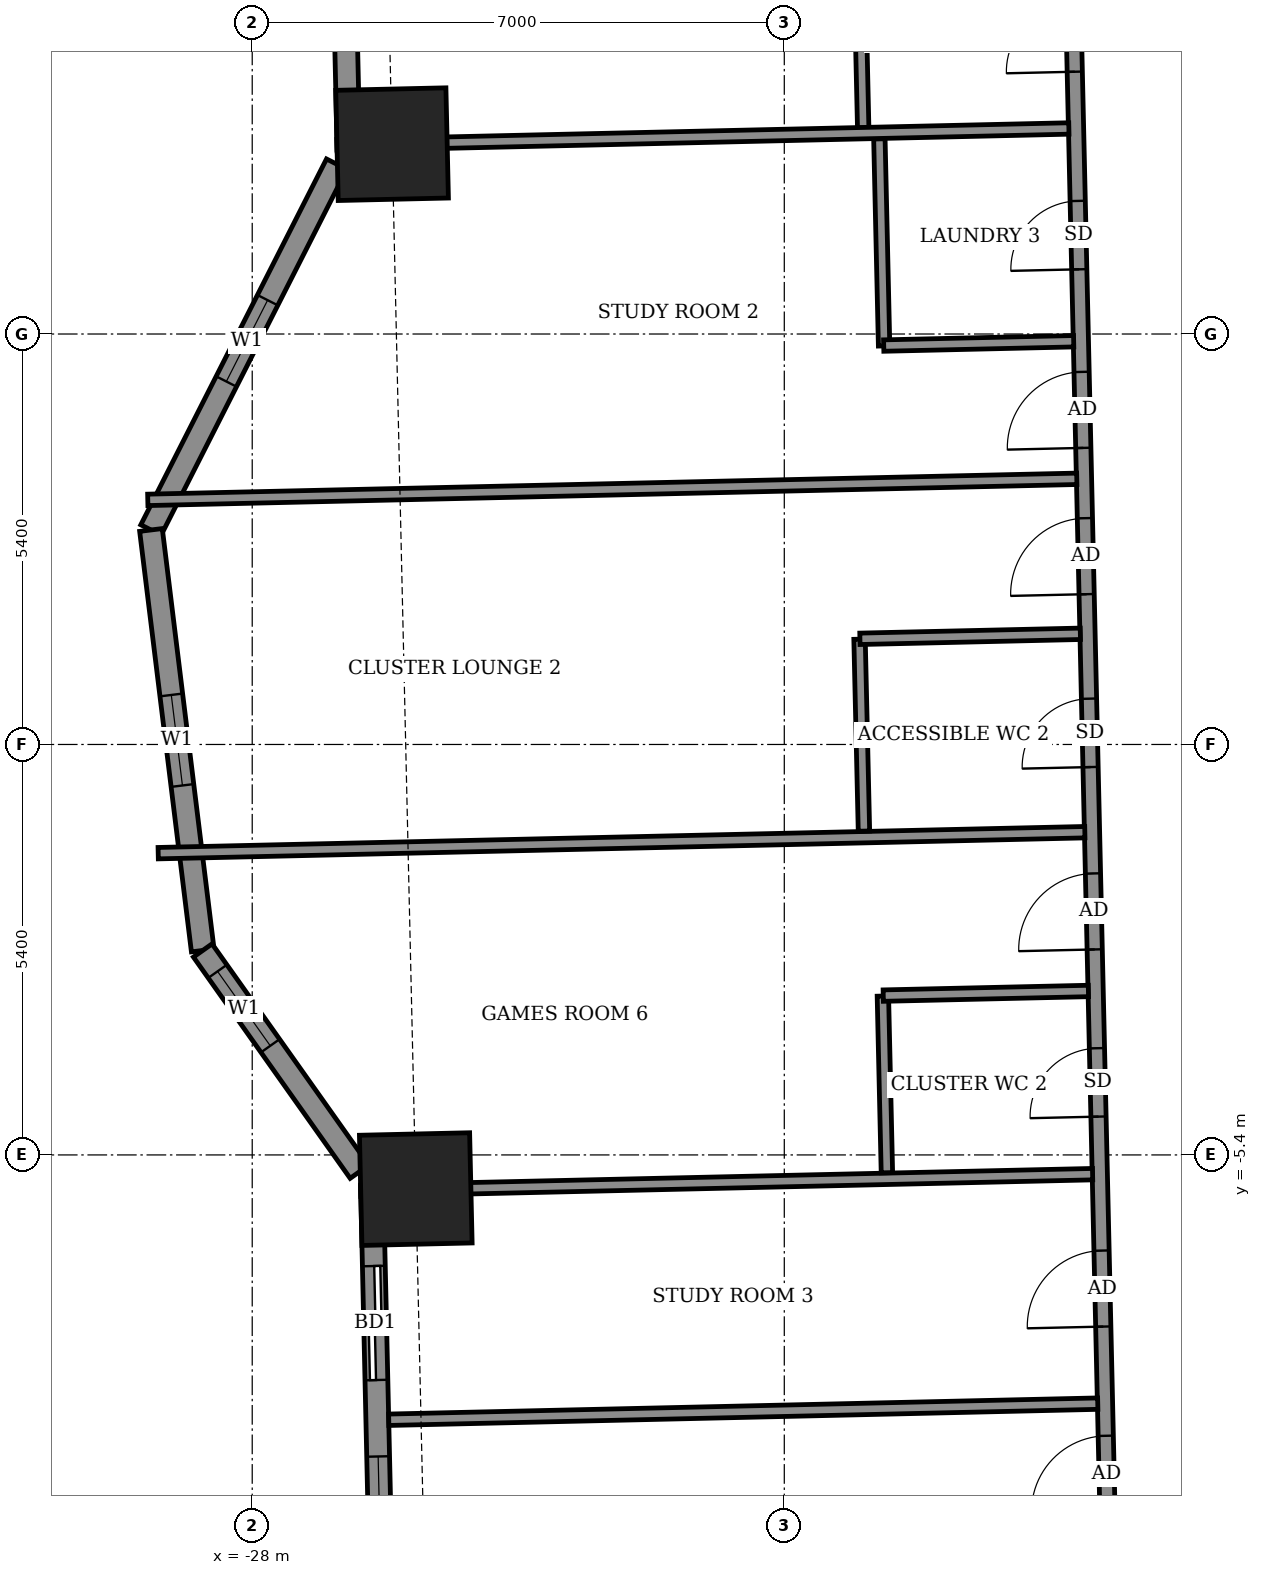
"""IFC4 building model, lengths in metres.
Left out: names, types, materials, properties, quantities, classifications, styles, units other than length and angle.
Written with IfcOpenShell. Run it as: python <this file> out.ifc"""

import sys

from ifc_helpers import new_model, si_unit, direction, frame, frame_2d, origin, origin_2d, place, context, subcontext, project, spatial, rectangle, extrude, element, fill, save


model = new_model("IFC4")
c1 = context("Model", 3, precision=1e-05, world=origin(), true_north=direction((0.0, 1.0)))
c2 = subcontext(c1, "Body", "Model", "MODEL_VIEW")
j1 = project(units=[si_unit("LENGTHUNIT", "METRE"), si_unit("PLANEANGLEUNIT", "RADIAN")], contexts=[c1])
p1 = place(None, origin())
s1 = spatial("IfcSite", under=j1, at=p1, CompositionType="ELEMENT")
p2 = place(p1, origin())
s2 = spatial("IfcBuilding", under=s1, at=p2, CompositionType="ELEMENT")
p3 = place(p2, frame((0.0, 0.0, 79.3)))
s3 = spatial("IfcBuildingStorey", under=s2, at=p3, CompositionType="ELEMENT", Elevation=79.3)
for number, where, z_axis, x_axis in (
    (1, (-25.848, -5.85, -0.55), (0.0, 0.0, 1.0), (0.023, -1.0, 0.0)),
    (2, (-26.16, 7.897, -0.55), (0.0, 0.0, 1.0), (0.023, -1.0, 0.0)),
):
    element("IfcColumn", number, at=place(p3, frame(where, z_axis=z_axis, x_axis=x_axis)), inside=s3, PredefinedType="COLUMN", context=c2, shape_type="SweptSolid", body=[
        extrude(rectangle(XDim=1.45, YDim=1.45, at=origin_2d()), origin(), (0.0, 0.0, 1.0), 3.6),
    ])
p4 = place(p3, frame((-27.036, 21.155, 0.0), z_axis=(0.0, 0.0, 1.0), x_axis=(0.022730142562, -0.999741636934, 0.0)))
e3 = element("IfcWall", 3, at=p4, inside=s3, PredefinedType="SOLIDWALL", context=c2, shape_type="SweptSolid", body=[
    extrude(rectangle(XDim=13.329, YDim=0.3, at=frame_2d((6.665, 0.0))), origin(), (0.0, 0.0, 1.0), 3.05),
])
p5 = place(p4, frame((2.818, 0.0, 0.0)))
e4 = element("IfcOpeningElement", 4, at=p5, cuts=e3, PredefinedType="OPENING", context=c2, shape_type="SweptSolid", body=[
    extrude(rectangle(XDim=1.5, YDim=2.4, at=frame_2d((0.75, 1.2))), frame((0.0, 0.16, 0.0), z_axis=(0.0, -1.0, 0.0), x_axis=(1.0, 0.0, 0.0)), (0.0, 0.0, 1.0), 0.32),
])
p6 = place(p4, frame((9.6, 0.0, 0.9)))
e5 = element("IfcOpeningElement", 5, at=p6, cuts=e3, PredefinedType="OPENING", context=c2, shape_type="SweptSolid", body=[
    extrude(rectangle(XDim=2.4, YDim=1.5, at=frame_2d((1.2, 0.75))), frame((0.0, 0.16, 0.0), z_axis=(0.0, -1.0, 0.0), x_axis=(1.0, 0.0, 0.0)), (0.0, 0.0, 1.0), 0.32),
])
p7 = place(p3, frame((-26.889, 7.635, 0.0), z_axis=(0.0, 0.0, 1.0), x_axis=(-0.452633159278, -0.891696822425, 0.0)))
e6 = element("IfcWall", 6, at=p7, inside=s3, PredefinedType="SOLIDWALL", context=c2, shape_type="SweptSolid", body=[
    extrude(rectangle(XDim=5.397, YDim=0.3, at=frame_2d((2.699, 0.0))), origin(), (0.0, 0.0, 1.0), 3.05),
])
p8 = place(p7, frame((2.007, 0.0, 0.9)))
e7 = element("IfcOpeningElement", 7, at=p8, cuts=e6, PredefinedType="OPENING", context=c2, shape_type="SweptSolid", body=[
    extrude(rectangle(XDim=1.2, YDim=1.5, at=frame_2d((0.6, 0.75))), frame((0.0, 0.16, 0.0), z_axis=(0.0, -1.0, 0.0), x_axis=(1.0, 0.0, 0.0)), (0.0, 0.0, 1.0), 0.32),
])
p9 = place(p3, frame((-29.332, 2.822, 0.0), z_axis=(0.0, 0.0, 1.0), x_axis=(0.122206978992, -0.992504636909, 0.0)))
e8 = element("IfcWall", 8, at=p9, inside=s3, PredefinedType="SOLIDWALL", context=c2, shape_type="SweptSolid", body=[
    extrude(rectangle(XDim=5.574, YDim=0.3, at=frame_2d((2.787, 0.0))), origin(), (0.0, 0.0, 1.0), 3.05),
])
p10 = place(p9, frame((2.187, 0.0, 0.9)))
e9 = element("IfcOpeningElement", 9, at=p10, cuts=e8, PredefinedType="OPENING", context=c2, shape_type="SweptSolid", body=[
    extrude(rectangle(XDim=1.2, YDim=1.5, at=frame_2d((0.6, 0.75))), frame((0.0, 0.16, 0.0), z_axis=(0.0, -1.0, 0.0), x_axis=(1.0, 0.0, 0.0)), (0.0, 0.0, 1.0), 0.32),
])
p11 = place(p3, frame((-28.651, -2.71, 0.0), z_axis=(0.0, 0.0, 1.0), x_axis=(0.577964171051, -0.816062140392, 0.0)))
e10 = element("IfcWall", 10, at=p11, inside=s3, PredefinedType="SOLIDWALL", context=c2, shape_type="SweptSolid", body=[
    extrude(rectangle(XDim=3.567, YDim=0.3, at=frame_2d((1.784, 0.0))), origin(), (0.0, 0.0, 1.0), 3.05),
])
p12 = place(p11, frame((0.337, 0.0, 0.9)))
e11 = element("IfcOpeningElement", 11, at=p12, cuts=e10, PredefinedType="OPENING", context=c2, shape_type="SweptSolid", body=[
    extrude(rectangle(XDim=1.2, YDim=1.5, at=frame_2d((0.6, 0.75))), frame((0.0, 0.16, 0.0), z_axis=(0.0, -1.0, 0.0), x_axis=(1.0, 0.0, 0.0)), (0.0, 0.0, 1.0), 0.32),
])
p13 = place(p3, frame((-26.424, -5.808, 0.0), z_axis=(0.0, 0.0, 1.0), x_axis=(0.022654755793, -0.999743348085, 0.0)))
e12 = element("IfcWall", 12, at=p13, inside=s3, PredefinedType="SOLIDWALL", context=c2, shape_type="SweptSolid", body=[
    extrude(rectangle(XDim=13.729, YDim=0.3, at=frame_2d((6.865, 0.0))), origin(), (0.0, 0.0, 1.0), 3.05),
])
p14 = place(p13, frame((1.054, 0.0, 0.0)))
e13 = element("IfcOpeningElement", 13, at=p14, cuts=e12, PredefinedType="OPENING", context=c2, shape_type="SweptSolid", body=[
    extrude(rectangle(XDim=1.5, YDim=2.4, at=frame_2d((0.75, 1.2))), frame((0.0, 0.16, 0.0), z_axis=(0.0, -1.0, 0.0), x_axis=(1.0, 0.0, 0.0)), (0.0, 0.0, 1.0), 0.32),
])
p15 = place(p13, frame((3.56, 0.0, 0.9)))
e14 = element("IfcOpeningElement", 14, at=p15, cuts=e12, PredefinedType="OPENING", context=c2, shape_type="SweptSolid", body=[
    extrude(rectangle(XDim=2.4, YDim=1.5, at=frame_2d((1.2, 0.75))), frame((0.0, 0.16, 0.0), z_axis=(0.0, -1.0, 0.0), x_axis=(1.0, 0.0, 0.0)), (0.0, 0.0, 1.0), 0.32),
])
p16 = place(p13, frame((8.882, 0.0, 0.9)))
e15 = element("IfcOpeningElement", 15, at=p16, cuts=e12, PredefinedType="OPENING", context=c2, shape_type="SweptSolid", body=[
    extrude(rectangle(XDim=2.4, YDim=1.5, at=frame_2d((1.2, 0.75))), frame((0.0, 0.16, 0.0), z_axis=(0.0, -1.0, 0.0), x_axis=(1.0, 0.0, 0.0)), (0.0, 0.0, 1.0), 0.32),
])
p17 = place(p3, frame((-16.684, -12.919, 0.0), z_axis=(0.0, 0.0, 1.0), x_axis=(-0.022706151961, 0.999742182097, 0.0)))
e16 = element("IfcWall", 16, at=p17, inside=s3, PredefinedType="PARTITIONING", context=c2, shape_type="SweptSolid", body=[
    extrude(rectangle(XDim=25.45, YDim=0.2, at=frame_2d((12.725, 0.0))), origin(), (0.0, 0.0, 1.0), 3.05),
])
p18 = place(p17, frame((23.938, 0.0, 0.0)))
e17 = element("IfcOpeningElement", 17, at=p18, cuts=e16, PredefinedType="OPENING", context=c2, shape_type="SweptSolid", body=[
    extrude(rectangle(XDim=1.0, YDim=2.1, at=frame_2d((0.5, 1.05))), frame((0.0, 0.11, 0.0), z_axis=(0.0, -1.0, 0.0), x_axis=(1.0, 0.0, 0.0)), (0.0, 0.0, 1.0), 0.22),
])
p19 = place(p17, frame((21.775, 0.0, 0.0)))
e18 = element("IfcOpeningElement", 18, at=p19, cuts=e16, PredefinedType="OPENING", context=c2, shape_type="SweptSolid", body=[
    extrude(rectangle(XDim=0.9, YDim=2.1, at=frame_2d((0.45, 1.05))), frame((0.0, 0.11, 0.0), z_axis=(0.0, -1.0, 0.0), x_axis=(1.0, 0.0, 0.0)), (0.0, 0.0, 1.0), 0.22),
])
p20 = place(p17, frame((16.825, 0.0, 0.0)))
e19 = element("IfcOpeningElement", 19, at=p20, cuts=e16, PredefinedType="OPENING", context=c2, shape_type="SweptSolid", body=[
    extrude(rectangle(XDim=1.0, YDim=2.1, at=frame_2d((0.5, 1.05))), frame((0.0, 0.11, 0.0), z_axis=(0.0, -1.0, 0.0), x_axis=(1.0, 0.0, 0.0)), (0.0, 0.0, 1.0), 0.22),
])
p21 = place(p17, frame((19.175, 0.0, 0.0)))
e20 = element("IfcOpeningElement", 20, at=p21, cuts=e16, PredefinedType="OPENING", context=c2, shape_type="SweptSolid", body=[
    extrude(rectangle(XDim=0.9, YDim=2.1, at=frame_2d((0.45, 1.05))), frame((0.0, 0.11, 0.0), z_axis=(0.0, -1.0, 0.0), x_axis=(1.0, 0.0, 0.0)), (0.0, 0.0, 1.0), 0.22),
])
p22 = place(p17, frame((14.9, 0.0, 0.0)))
e21 = element("IfcOpeningElement", 21, at=p22, cuts=e16, PredefinedType="OPENING", context=c2, shape_type="SweptSolid", body=[
    extrude(rectangle(XDim=1.0, YDim=2.1, at=frame_2d((0.5, 1.05))), frame((0.0, 0.11, 0.0), z_axis=(0.0, -1.0, 0.0), x_axis=(1.0, 0.0, 0.0)), (0.0, 0.0, 1.0), 0.22),
])
p23 = place(p17, frame((12.625, 0.0, 0.0)))
e22 = element("IfcOpeningElement", 22, at=p23, cuts=e16, PredefinedType="OPENING", context=c2, shape_type="SweptSolid", body=[
    extrude(rectangle(XDim=0.9, YDim=2.1, at=frame_2d((0.45, 1.05))), frame((0.0, 0.11, 0.0), z_axis=(0.0, -1.0, 0.0), x_axis=(1.0, 0.0, 0.0)), (0.0, 0.0, 1.0), 0.22),
])
p24 = place(p17, frame((10.225, 0.0, 0.0)))
e23 = element("IfcOpeningElement", 23, at=p24, cuts=e16, PredefinedType="OPENING", context=c2, shape_type="SweptSolid", body=[
    extrude(rectangle(XDim=1.0, YDim=2.1, at=frame_2d((0.5, 1.05))), frame((0.0, 0.11, 0.0), z_axis=(0.0, -1.0, 0.0), x_axis=(1.0, 0.0, 0.0)), (0.0, 0.0, 1.0), 0.22),
])
p25 = place(p17, frame((8.025, 0.0, 0.0)))
e24 = element("IfcOpeningElement", 24, at=p25, cuts=e16, PredefinedType="OPENING", context=c2, shape_type="SweptSolid", body=[
    extrude(rectangle(XDim=0.9, YDim=2.1, at=frame_2d((0.45, 1.05))), frame((0.0, 0.11, 0.0), z_axis=(0.0, -1.0, 0.0), x_axis=(1.0, 0.0, 0.0)), (0.0, 0.0, 1.0), 0.22),
])
p26 = place(p17, frame((5.262, 0.0, 0.0)))
e25 = element("IfcOpeningElement", 25, at=p26, cuts=e16, PredefinedType="OPENING", context=c2, shape_type="SweptSolid", body=[
    extrude(rectangle(XDim=1.0, YDim=2.1, at=frame_2d((0.5, 1.05))), frame((0.0, 0.11, 0.0), z_axis=(0.0, -1.0, 0.0), x_axis=(1.0, 0.0, 0.0)), (0.0, 0.0, 1.0), 0.22),
])
p27 = place(p17, frame((2.825, 0.0, 0.0)))
e26 = element("IfcOpeningElement", 26, at=p27, cuts=e16, PredefinedType="OPENING", context=c2, shape_type="SweptSolid", body=[
    extrude(rectangle(XDim=1.0, YDim=2.1, at=frame_2d((0.5, 1.05))), frame((0.0, 0.11, 0.0), z_axis=(0.0, -1.0, 0.0), x_axis=(1.0, 0.0, 0.0)), (0.0, 0.0, 1.0), 0.22),
])
p28 = place(p17, frame((0.75, 0.0, 0.0)))
e27 = element("IfcOpeningElement", 27, at=p28, cuts=e16, PredefinedType="OPENING", context=c2, shape_type="SweptSolid", body=[
    extrude(rectangle(XDim=0.9, YDim=2.1, at=frame_2d((0.45, 1.05))), frame((0.0, 0.11, 0.0), z_axis=(0.0, -1.0, 0.0), x_axis=(1.0, 0.0, 0.0)), (0.0, 0.0, 1.0), 0.22),
])
p29 = place(p3, frame((-26.204, -8.884, 0.0), z_axis=(0.0, 0.0, 1.0), x_axis=(0.999742051634, 0.022711895436, 0.0)))
e28 = element("IfcWall", 28, at=p29, inside=s3, PredefinedType="PARTITIONING", context=c2, shape_type="SweptSolid", body=[
    extrude(rectangle(XDim=9.331, YDim=0.15, at=frame_2d((4.665, 0.0))), origin(), (0.0, 0.0, 1.0), 2.55),
])
p30 = place(p3, frame((-26.573, -5.871, 0.0), z_axis=(0.0, 0.0, 1.0), x_axis=(0.999743768709, 0.022636186244, 0.0)))
e29 = element("IfcWall", 29, at=p30, inside=s3, PredefinedType="PARTITIONING", context=c2, shape_type="SweptSolid", body=[
    extrude(rectangle(XDim=9.631, YDim=0.15, at=frame_2d((4.816, 0.0))), origin(), (0.0, 0.0, 1.0), 3.05),
])
p31 = place(p3, frame((-19.65, -5.634, 0.0), z_axis=(0.0, 0.0, 1.0), x_axis=(-0.02279059109, 0.999740260747, 0.0)))
e30 = element("IfcWall", 30, at=p31, inside=s3, PredefinedType="PARTITIONING", context=c2, shape_type="SweptSolid", body=[
    extrude(rectangle(XDim=2.324, YDim=0.15, at=frame_2d((1.162, 0.0))), origin(), (0.0, 0.0, 1.0), 3.05),
])
p32 = place(p3, frame((-19.698, -3.304, 0.0), z_axis=(0.0, 0.0, 1.0), x_axis=(0.999744396973, 0.02260842146, 0.0)))
e31 = element("IfcWall", 31, at=p32, inside=s3, PredefinedType="PARTITIONING", context=c2, shape_type="SweptSolid", body=[
    extrude(rectangle(XDim=2.7, YDim=0.15, at=frame_2d((1.35, 0.0))), origin(), (0.0, 0.0, 1.0), 3.05),
])
p33 = place(p3, frame((-29.237, -1.43, 0.0), z_axis=(0.0, 0.0, 1.0), x_axis=(0.999744053012, 0.022623626312, 0.0)))
e32 = element("IfcWall", 32, at=p33, inside=s3, PredefinedType="PARTITIONING", context=c2, shape_type="SweptSolid", body=[
    extrude(rectangle(XDim=12.194, YDim=0.15, at=frame_2d((6.097, 0.0))), origin(), (0.0, 0.0, 1.0), 2.1),
])
p34 = place(p3, frame((-19.952, -1.14, 0.0), z_axis=(0.0, 0.0, 1.0), x_axis=(-0.023006865507, 0.999735307039, 0.0)))
e33 = element("IfcWall", 33, at=p34, inside=s3, PredefinedType="PARTITIONING", context=c2, shape_type="SweptSolid", body=[
    extrude(rectangle(XDim=2.526, YDim=0.15, at=frame_2d((1.263, 0.0))), origin(), (0.0, 0.0, 1.0), 3.05),
])
p35 = place(p3, frame((-20.005, 1.39, 0.0), z_axis=(0.0, 0.0, 1.0), x_axis=(0.999739832865, 0.022809352981, 0.0)))
e34 = element("IfcWall", 34, at=p35, inside=s3, PredefinedType="PARTITIONING", context=c2, shape_type="SweptSolid", body=[
    extrude(rectangle(XDim=2.901, YDim=0.15, at=frame_2d((1.45, 0.0))), origin(), (0.0, 0.0, 1.0), 3.05),
])
p36 = place(p3, frame((-29.374, 3.218, 0.0), z_axis=(0.0, 0.0, 1.0), x_axis=(0.99974308155, 0.022666514803, 0.0)))
e35 = element("IfcWall", 35, at=p36, inside=s3, PredefinedType="PARTITIONING", context=c2, shape_type="SweptSolid", body=[
    extrude(rectangle(XDim=12.225, YDim=0.15, at=frame_2d((6.113, 0.0))), origin(), (0.0, 0.0, 1.0), 2.1),
])
p37 = place(p3, frame((-19.687, 5.243, 0.0), z_axis=(0.0, 0.0, 1.0), x_axis=(-0.022758040381, 0.999741002259, 0.0)))
e36 = element("IfcWall", 36, at=p37, inside=s3, PredefinedType="PARTITIONING", context=c2, shape_type="SweptSolid", body=[
    extrude(rectangle(XDim=2.725, YDim=0.15, at=frame_2d((1.362, 0.0))), origin(), (0.0, 0.0, 1.0), 3.05),
])
p38 = place(p3, frame((-19.692, 5.248, 0.0), z_axis=(0.0, 0.0, 1.0), x_axis=(0.999740977561, 0.022759125332, 0.0)))
e37 = element("IfcWall", 37, at=p38, inside=s3, PredefinedType="PARTITIONING", context=c2, shape_type="SweptSolid", body=[
    extrude(rectangle(XDim=2.5, YDim=0.15, at=frame_2d((1.25, 0.0))), origin(), (0.0, 0.0, 1.0), 3.05),
])
p39 = place(p3, frame((-19.962, 8.112, 0.0), z_axis=(0.0, 0.0, 1.0), x_axis=(-0.022781023197, 0.999740478815, 0.0)))
e38 = element("IfcWall", 38, at=p39, inside=s3, PredefinedType="PARTITIONING", context=c2, shape_type="SweptSolid", body=[
    extrude(rectangle(XDim=2.325, YDim=0.15, at=frame_2d((1.163, 0.0))), origin(), (0.0, 0.0, 1.0), 3.05),
])
p40 = place(p3, frame((-26.885, 7.885, 0.0), z_axis=(0.0, 0.0, 1.0), x_axis=(0.999741468995, 0.022737527832, 0.0)))
e39 = element("IfcWall", 39, at=p40, inside=s3, PredefinedType="PARTITIONING", context=c2, shape_type="SweptSolid", body=[
    extrude(rectangle(XDim=9.631, YDim=0.15, at=frame_2d((4.816, 0.0))), origin(), (0.0, 0.0, 1.0), 3.05),
])
p41 = place(p8, origin())
e40 = element("IfcWindow", 40, at=p41, inside=s3, PartitioningType="SINGLE_PANEL", PredefinedType="WINDOW", context=c2, shape_type="SweptSolid", body=[
    extrude(rectangle(XDim=1.2, YDim=1.5, at=frame_2d((0.6, 0.75))), frame((0.0, 0.03, 0.0), z_axis=(0.0, -1.0, 0.0), x_axis=(1.0, 0.0, 0.0)), (0.0, 0.0, 1.0), 0.06),
])
fill(e7, e40)
p42 = place(p10, origin())
e41 = element("IfcWindow", 41, at=p42, inside=s3, PartitioningType="SINGLE_PANEL", PredefinedType="WINDOW", context=c2, shape_type="SweptSolid", body=[
    extrude(rectangle(XDim=1.2, YDim=1.5, at=frame_2d((0.6, 0.75))), frame((0.0, 0.03, 0.0), z_axis=(0.0, -1.0, 0.0), x_axis=(1.0, 0.0, 0.0)), (0.0, 0.0, 1.0), 0.06),
])
fill(e9, e41)
p43 = place(p12, origin())
e42 = element("IfcWindow", 42, at=p43, inside=s3, PartitioningType="SINGLE_PANEL", PredefinedType="WINDOW", context=c2, shape_type="SweptSolid", body=[
    extrude(rectangle(XDim=1.2, YDim=1.5, at=frame_2d((0.6, 0.75))), frame((0.0, 0.03, 0.0), z_axis=(0.0, -1.0, 0.0), x_axis=(1.0, 0.0, 0.0)), (0.0, 0.0, 1.0), 0.06),
])
fill(e11, e42)
p44 = place(p14, origin())
e43 = element("IfcDoor", 43, at=p44, inside=s3, OperationType="SLIDING_TO_LEFT", PredefinedType="DOOR", context=c2, shape_type="SweptSolid", body=[
    extrude(rectangle(XDim=1.5, YDim=2.4, at=frame_2d((0.75, 1.2))), frame((0.0, 0.025, 0.0), z_axis=(0.0, -1.0, 0.0), x_axis=(1.0, 0.0, 0.0)), (0.0, 0.0, 1.0), 0.05),
])
fill(e13, e43)
p45 = place(p15, origin())
e44 = element("IfcWindow", 44, at=p45, inside=s3, PartitioningType="DOUBLE_PANEL_VERTICAL", PredefinedType="WINDOW", context=c2, shape_type="SweptSolid", body=[
    extrude(rectangle(XDim=2.4, YDim=1.5, at=frame_2d((1.2, 0.75))), frame((0.0, 0.03, 0.0), z_axis=(0.0, -1.0, 0.0), x_axis=(1.0, 0.0, 0.0)), (0.0, 0.0, 1.0), 0.06),
])
fill(e14, e44)
p46 = place(p19, origin())
e45 = element("IfcDoor", 45, at=p46, inside=s3, OperationType="SINGLE_SWING_LEFT", PredefinedType="DOOR", context=c2, shape_type="SweptSolid", body=[
    extrude(rectangle(XDim=0.9, YDim=2.1, at=frame_2d((0.45, 1.05))), frame((0.0, 0.025, 0.0), z_axis=(0.0, -1.0, 0.0), x_axis=(1.0, 0.0, 0.0)), (0.0, 0.0, 1.0), 0.05),
])
fill(e18, e45)
p47 = place(p20, origin())
e46 = element("IfcDoor", 46, at=p47, inside=s3, OperationType="SINGLE_SWING_RIGHT", PredefinedType="DOOR", context=c2, shape_type="SweptSolid", body=[
    extrude(rectangle(XDim=1.0, YDim=2.1, at=frame_2d((0.5, 1.05))), frame((0.0, 0.025, 0.0), z_axis=(0.0, -1.0, 0.0), x_axis=(1.0, 0.0, 0.0)), (0.0, 0.0, 1.0), 0.05),
])
fill(e19, e46)
p48 = place(p21, origin())
e47 = element("IfcDoor", 47, at=p48, inside=s3, OperationType="SINGLE_SWING_RIGHT", PredefinedType="DOOR", context=c2, shape_type="SweptSolid", body=[
    extrude(rectangle(XDim=0.9, YDim=2.1, at=frame_2d((0.45, 1.05))), frame((0.0, 0.025, 0.0), z_axis=(0.0, -1.0, 0.0), x_axis=(1.0, 0.0, 0.0)), (0.0, 0.0, 1.0), 0.05),
])
fill(e20, e47)
p49 = place(p22, origin())
e48 = element("IfcDoor", 48, at=p49, inside=s3, OperationType="SINGLE_SWING_LEFT", PredefinedType="DOOR", context=c2, shape_type="SweptSolid", body=[
    extrude(rectangle(XDim=1.0, YDim=2.1, at=frame_2d((0.5, 1.05))), frame((0.0, 0.025, 0.0), z_axis=(0.0, -1.0, 0.0), x_axis=(1.0, 0.0, 0.0)), (0.0, 0.0, 1.0), 0.05),
])
fill(e21, e48)
p50 = place(p23, origin())
e49 = element("IfcDoor", 49, at=p50, inside=s3, OperationType="SINGLE_SWING_LEFT", PredefinedType="DOOR", context=c2, shape_type="SweptSolid", body=[
    extrude(rectangle(XDim=0.9, YDim=2.1, at=frame_2d((0.45, 1.05))), frame((0.0, 0.025, 0.0), z_axis=(0.0, -1.0, 0.0), x_axis=(1.0, 0.0, 0.0)), (0.0, 0.0, 1.0), 0.05),
])
fill(e22, e49)
p51 = place(p24, origin())
e50 = element("IfcDoor", 50, at=p51, inside=s3, OperationType="SINGLE_SWING_RIGHT", PredefinedType="DOOR", context=c2, shape_type="SweptSolid", body=[
    extrude(rectangle(XDim=1.0, YDim=2.1, at=frame_2d((0.5, 1.05))), frame((0.0, 0.025, 0.0), z_axis=(0.0, -1.0, 0.0), x_axis=(1.0, 0.0, 0.0)), (0.0, 0.0, 1.0), 0.05),
])
fill(e23, e50)
p52 = place(p25, origin())
e51 = element("IfcDoor", 51, at=p52, inside=s3, OperationType="SINGLE_SWING_RIGHT", PredefinedType="DOOR", context=c2, shape_type="SweptSolid", body=[
    extrude(rectangle(XDim=0.9, YDim=2.1, at=frame_2d((0.45, 1.05))), frame((0.0, 0.025, 0.0), z_axis=(0.0, -1.0, 0.0), x_axis=(1.0, 0.0, 0.0)), (0.0, 0.0, 1.0), 0.05),
])
fill(e24, e51)
p53 = place(p26, origin())
e52 = element("IfcDoor", 52, at=p53, inside=s3, OperationType="SINGLE_SWING_LEFT", PredefinedType="DOOR", context=c2, shape_type="SweptSolid", body=[
    extrude(rectangle(XDim=1.0, YDim=2.1, at=frame_2d((0.5, 1.05))), frame((0.0, 0.025, 0.0), z_axis=(0.0, -1.0, 0.0), x_axis=(1.0, 0.0, 0.0)), (0.0, 0.0, 1.0), 0.05),
])
fill(e25, e52)
p54 = place(p27, origin())
e53 = element("IfcDoor", 53, at=p54, inside=s3, OperationType="SINGLE_SWING_RIGHT", PredefinedType="DOOR", context=c2, shape_type="SweptSolid", body=[
    extrude(rectangle(XDim=1.0, YDim=2.1, at=frame_2d((0.5, 1.05))), frame((0.0, 0.025, 0.0), z_axis=(0.0, -1.0, 0.0), x_axis=(1.0, 0.0, 0.0)), (0.0, 0.0, 1.0), 0.05),
])
fill(e26, e53)
save(model, sys.argv[1])
